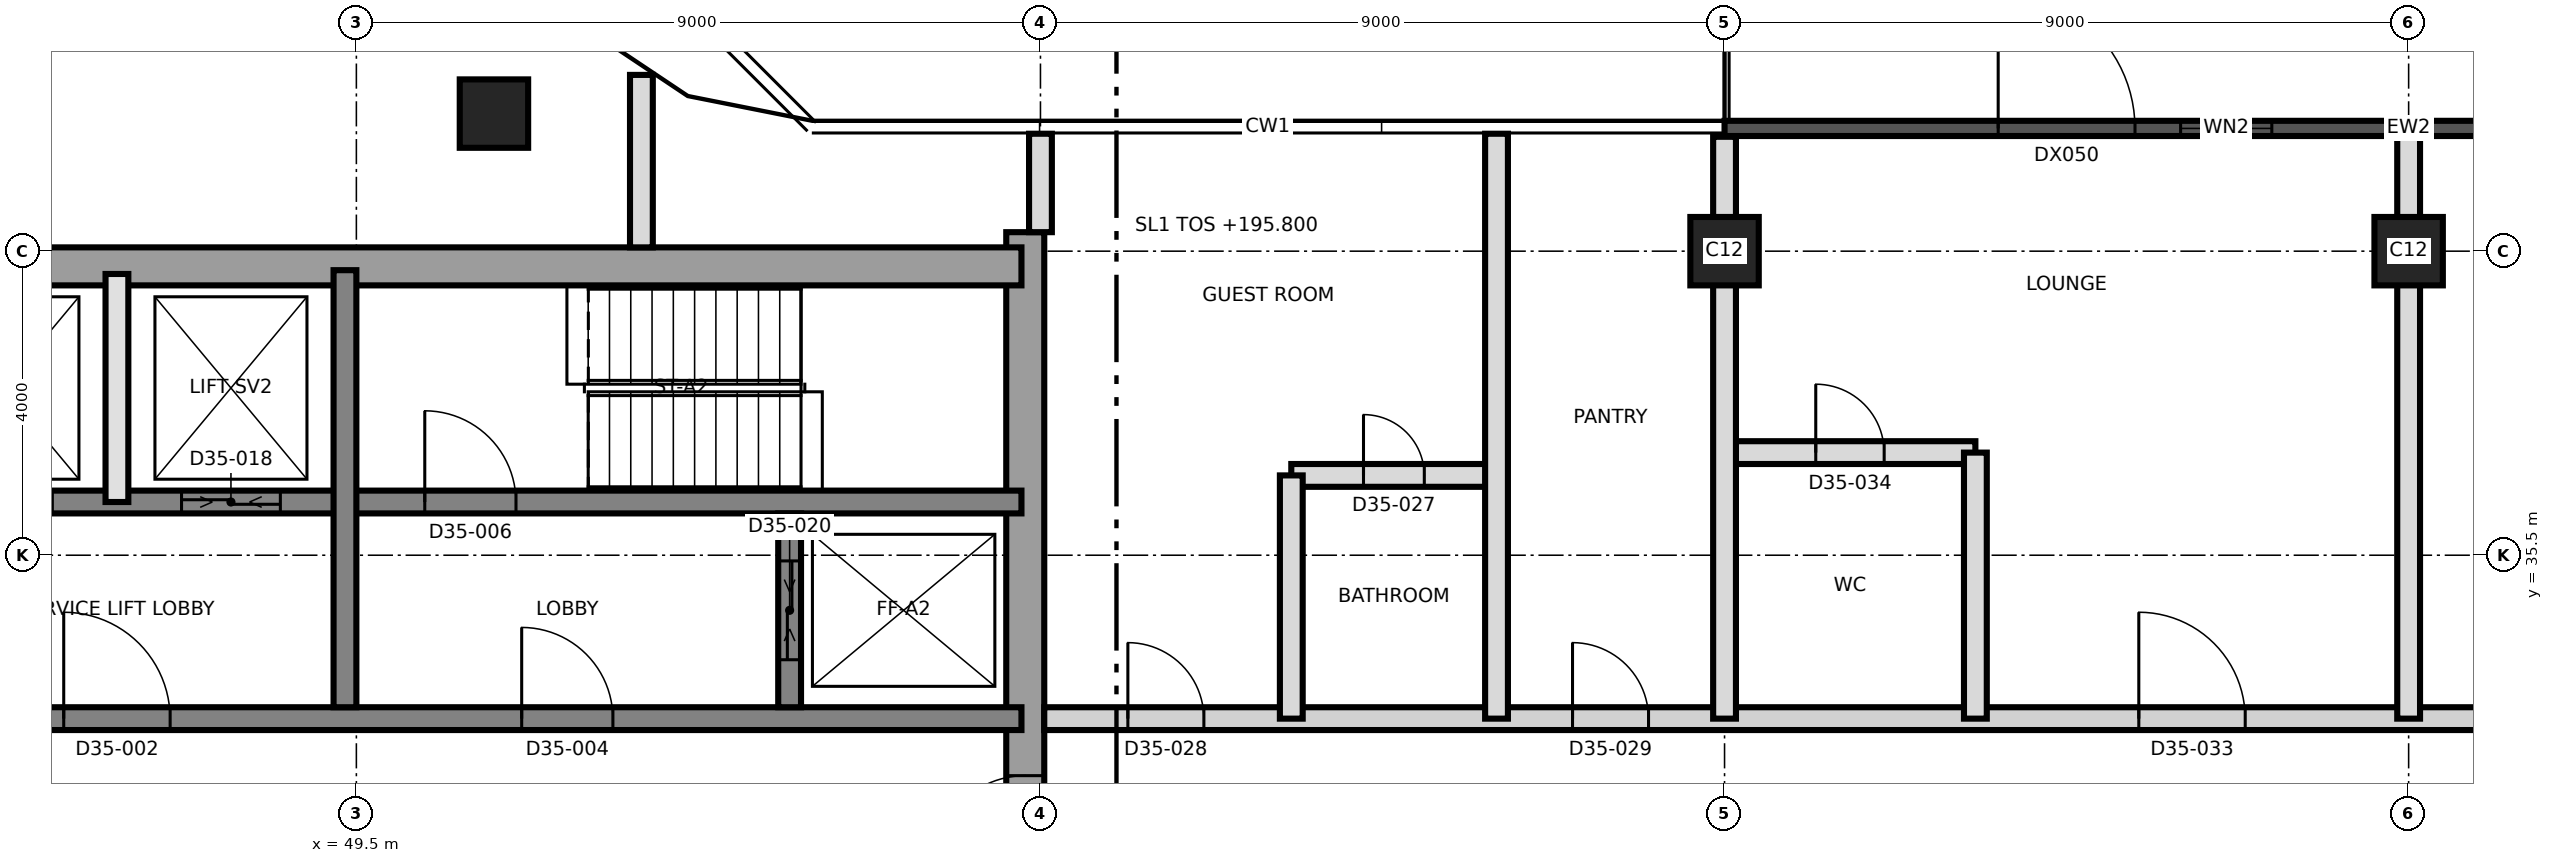
"""IFC4 building model, lengths in metres.
Left out: names, types, materials, properties, quantities, classifications, styles, units other than length and angle.
Written with IfcOpenShell. Run it as: python <this file> out.ifc"""

import sys

from ifc_helpers import new_model, si_unit, direction, frame, frame_2d, origin, origin_2d, place, context, subcontext, project, spatial, rectangle, extrude, element, fill, save


model = new_model("IFC4")
c1 = context("Model", 3, precision=1e-05, world=origin(), true_north=direction((0.0, 1.0)))
c2 = subcontext(c1, "Body", "Model", "MODEL_VIEW")
j1 = project(units=[si_unit("LENGTHUNIT", "METRE"), si_unit("PLANEANGLEUNIT", "RADIAN")], contexts=[c1])
p1 = place(None, origin())
s1 = spatial("IfcSite", under=j1, at=p1, CompositionType="ELEMENT")
p2 = place(p1, origin())
s2 = spatial("IfcBuilding", under=s1, at=p2, CompositionType="ELEMENT")
p3 = place(p2, frame((0.0, 0.0, 195.8)))
s3 = spatial("IfcBuildingStorey", under=s2, at=p3, CompositionType="ELEMENT", Elevation=195.8)
p4 = place(p3, frame((58.3, 21.25, 0.0), z_axis=(0.0, 0.0, 1.0), x_axis=(0.0, 1.0, 0.0)))
e1 = element("IfcWall", 1, at=p4, inside=s3, PredefinedType="SHEAR", context=c2, shape_type="SweptSolid", body=[
    extrude(rectangle(XDim=18.5, YDim=0.5, at=frame_2d((9.25, 0.0))), origin(), (0.0, 0.0, 1.0), 3.7),
])
p5 = place(p4, frame((10.15, 0.0, 0.0)))
e2 = element("IfcOpeningElement", 2, at=p5, cuts=e1, PredefinedType="OPENING", context=c2, shape_type="SweptSolid", body=[
    extrude(rectangle(XDim=1.2, YDim=2.1, at=frame_2d((0.6, 1.05))), frame((0.0, 0.26, 0.0), z_axis=(0.0, -1.0, 0.0), x_axis=(1.0, 0.0, 0.0)), (0.0, 0.0, 1.0), 0.52),
])
p6 = place(p3, frame((31.25, 39.3, 0.0), z_axis=(0.0, 0.0, 1.0), x_axis=(1.0, 0.0, 0.0)))
e3 = element("IfcWall", 3, at=p6, inside=s3, PredefinedType="SHEAR", context=c2, shape_type="SweptSolid", body=[
    extrude(rectangle(XDim=27.0, YDim=0.5, at=frame_2d((13.5, 0.0))), origin(), (0.0, 0.0, 1.0), 3.7),
])
p7 = place(p6, frame((10.45, 0.0, 0.0)))
e4 = element("IfcOpeningElement", 4, at=p7, cuts=e3, PredefinedType="OPENING", context=c2, shape_type="SweptSolid", body=[
    extrude(rectangle(XDim=1.2, YDim=2.1, at=frame_2d((0.6, 1.05))), frame((0.0, 0.26, 0.0), z_axis=(0.0, -1.0, 0.0), x_axis=(1.0, 0.0, 0.0)), (0.0, 0.0, 1.0), 0.52),
])
p8 = place(p3, frame((31.75, 33.35, 0.0), z_axis=(0.0, 0.0, 1.0), x_axis=(1.0, 0.0, 0.0)))
e5 = element("IfcWall", 5, at=p8, inside=s3, PredefinedType="SHEAR", context=c2, shape_type="SweptSolid", body=[
    extrude(rectangle(XDim=26.5, YDim=0.3, at=frame_2d((13.25, 0.0))), origin(), (0.0, 0.0, 1.0), 3.7),
])
p9 = place(p8, frame((13.9, 0.0, 0.0)))
e6 = element("IfcOpeningElement", 6, at=p9, cuts=e5, PredefinedType="OPENING", context=c2, shape_type="SweptSolid", body=[
    extrude(rectangle(XDim=1.4, YDim=2.1, at=frame_2d((0.7, 1.05))), frame((0.0, 0.16, 0.0), z_axis=(0.0, -1.0, 0.0), x_axis=(1.0, 0.0, 0.0)), (0.0, 0.0, 1.0), 0.32),
])
p10 = place(p8, frame((5.375, 0.0, 0.0)))
e7 = element("IfcOpeningElement", 7, at=p10, cuts=e5, PredefinedType="OPENING", context=c2, shape_type="SweptSolid", body=[
    extrude(rectangle(XDim=1.2, YDim=2.1, at=frame_2d((0.6, 1.05))), frame((0.0, 0.16, 0.0), z_axis=(0.0, -1.0, 0.0), x_axis=(1.0, 0.0, 0.0)), (0.0, 0.0, 1.0), 0.32),
])
p11 = place(p8, frame((19.925, 0.0, 0.0)))
e8 = element("IfcOpeningElement", 8, at=p11, cuts=e5, PredefinedType="OPENING", context=c2, shape_type="SweptSolid", body=[
    extrude(rectangle(XDim=1.2, YDim=2.1, at=frame_2d((0.6, 1.05))), frame((0.0, 0.16, 0.0), z_axis=(0.0, -1.0, 0.0), x_axis=(1.0, 0.0, 0.0)), (0.0, 0.0, 1.0), 0.32),
])
p12 = place(p3, frame((43.5, 36.2, 0.0), z_axis=(0.0, 0.0, 1.0), x_axis=(1.0, 0.0, 0.0)))
e9 = element("IfcWall", 9, at=p12, inside=s3, PredefinedType="SHEAR", context=c2, shape_type="SweptSolid", body=[
    extrude(rectangle(XDim=14.75, YDim=0.3, at=frame_2d((7.375, 0.0))), origin(), (0.0, 0.0, 1.0), 3.7),
])
p13 = place(p12, frame((6.9, 0.0, 0.0)))
e10 = element("IfcOpeningElement", 10, at=p13, cuts=e9, PredefinedType="OPENING", context=c2, shape_type="SweptSolid", body=[
    extrude(rectangle(XDim=1.2, YDim=2.1, at=frame_2d((0.6, 1.05))), frame((0.0, 0.16, 0.0), z_axis=(0.0, -1.0, 0.0), x_axis=(1.0, 0.0, 0.0)), (0.0, 0.0, 1.0), 0.32),
])
p14 = place(p12, frame((0.7, 0.0, 0.0)))
e11 = element("IfcOpeningElement", 11, at=p14, cuts=e9, PredefinedType="OPENING", context=c2, shape_type="SweptSolid", body=[
    extrude(rectangle(XDim=1.3, YDim=2.4, at=frame_2d((0.65, 1.2))), frame((0.0, 0.16, 0.0), z_axis=(0.0, -1.0, 0.0), x_axis=(1.0, 0.0, 0.0)), (0.0, 0.0, 1.0), 0.32),
])
p15 = place(p12, frame((3.7, 0.0, 0.0)))
e12 = element("IfcOpeningElement", 12, at=p15, cuts=e9, PredefinedType="OPENING", context=c2, shape_type="SweptSolid", body=[
    extrude(rectangle(XDim=1.3, YDim=2.4, at=frame_2d((0.65, 1.2))), frame((0.0, 0.16, 0.0), z_axis=(0.0, -1.0, 0.0), x_axis=(1.0, 0.0, 0.0)), (0.0, 0.0, 1.0), 0.32),
])
p16 = place(p3, frame((49.35, 33.5, 0.0), z_axis=(0.0, 0.0, 1.0), x_axis=(0.0, 1.0, 0.0)))
e13 = element("IfcWall", 13, at=p16, inside=s3, PredefinedType="SHEAR", context=c2, shape_type="SweptSolid", body=[
    extrude(rectangle(XDim=5.75, YDim=0.3, at=frame_2d((2.875, 0.0))), origin(), (0.0, 0.0, 1.0), 3.7),
])
p17 = place(p3, frame((55.2, 33.5, 0.0), z_axis=(0.0, 0.0, 1.0), x_axis=(0.0, 1.0, 0.0)))
e14 = element("IfcWall", 14, at=p17, inside=s3, PredefinedType="SHEAR", context=c2, shape_type="SweptSolid", body=[
    extrude(rectangle(XDim=2.55, YDim=0.3, at=frame_2d((1.275, 0.0))), origin(), (0.0, 0.0, 1.0), 3.7),
])
p18 = place(p17, frame((0.625, 0.0, 0.0)))
e15 = element("IfcOpeningElement", 15, at=p18, cuts=e14, PredefinedType="OPENING", context=c2, shape_type="SweptSolid", body=[
    extrude(rectangle(XDim=1.3, YDim=2.4, at=frame_2d((0.65, 1.2))), frame((0.0, 0.16, 0.0), z_axis=(0.0, -1.0, 0.0), x_axis=(1.0, 0.0, 0.0)), (0.0, 0.0, 1.0), 0.32),
])
for number, where, z_axis, x_axis in (
    (16, (67.5, 39.5, 0.0), (0.0, 0.0, 1.0), (1.0, 0.0, 0.0)),
    (17, (76.5, 39.5, 0.0), (0.0, 0.0, 1.0), (1.0, 0.0, 0.0)),
    (18, (51.31, 41.31, 0.0), (0.0, 0.0, 1.0), (1.0, 0.0, 0.0)),
):
    element("IfcColumn", number, at=place(p3, frame(where, z_axis=z_axis, x_axis=x_axis)), inside=s3, PredefinedType="COLUMN", context=c2, shape_type="SweptSolid", body=[
        extrude(rectangle(XDim=0.9, YDim=0.9, at=origin_2d()), origin(), (0.0, 0.0, 1.0), 3.7),
    ])
p19 = place(p3, frame((67.5, 41.115, 0.0), z_axis=(0.0, 0.0, 1.0), x_axis=(1.0, 0.0, 0.0)))
e19 = element("IfcWall", 19, at=p19, inside=s3, PredefinedType="SOLIDWALL", context=c2, shape_type="SweptSolid", body=[
    extrude(rectangle(XDim=18.0, YDim=0.2, at=frame_2d((9.0, 0.0))), origin(), (0.0, 0.0, 1.0), 3.4),
])
p20 = place(p19, frame((12.6, 0.0, 0.0)))
e20 = element("IfcOpeningElement", 20, at=p20, cuts=e19, PredefinedType="OPENING", context=c2, shape_type="SweptSolid", body=[
    extrude(rectangle(XDim=1.8, YDim=2.4, at=frame_2d((0.9, 1.2))), frame((0.0, 0.11, 0.0), z_axis=(0.0, -1.0, 0.0), x_axis=(1.0, 0.0, 0.0)), (0.0, 0.0, 1.0), 0.22),
])
p21 = place(p19, frame((10.8, 0.0, 0.9)))
e21 = element("IfcOpeningElement", 21, at=p21, cuts=e19, PredefinedType="OPENING", context=c2, shape_type="SweptSolid", body=[
    extrude(rectangle(XDim=1.2, YDim=2.1, at=frame_2d((0.6, 1.05))), frame((0.0, 0.11, 0.0), z_axis=(0.0, -1.0, 0.0), x_axis=(1.0, 0.0, 0.0)), (0.0, 0.0, 1.0), 0.22),
])
p22 = place(p19, frame((6.0, 0.0, 0.9)))
e22 = element("IfcOpeningElement", 22, at=p22, cuts=e19, PredefinedType="OPENING", context=c2, shape_type="SweptSolid", body=[
    extrude(rectangle(XDim=1.2, YDim=2.1, at=frame_2d((0.6, 1.05))), frame((0.0, 0.11, 0.0), z_axis=(0.0, -1.0, 0.0), x_axis=(1.0, 0.0, 0.0)), (0.0, 0.0, 1.0), 0.22),
])
p23 = place(p19, frame((3.6, 0.0, 0.0)))
e23 = element("IfcOpeningElement", 23, at=p23, cuts=e19, PredefinedType="OPENING", context=c2, shape_type="SweptSolid", body=[
    extrude(rectangle(XDim=1.8, YDim=2.4, at=frame_2d((0.9, 1.2))), frame((0.0, 0.11, 0.0), z_axis=(0.0, -1.0, 0.0), x_axis=(1.0, 0.0, 0.0)), (0.0, 0.0, 1.0), 0.22),
])
p24 = place(p3, frame((46.35, 36.2, 0.0), z_axis=(0.0, 0.0, 1.0), x_axis=(0.0, 1.0, 0.0)))
e24 = element("IfcWall", 24, at=p24, inside=s3, PredefinedType="SOLIDWALL", context=c2, shape_type="SweptSolid", body=[
    extrude(rectangle(XDim=3.0, YDim=0.3, at=frame_2d((1.5, 0.0))), origin(), (0.0, 0.0, 1.0), 3.4),
])
p25 = place(p3, frame((58.55, 33.35, 0.0), z_axis=(0.0, 0.0, 1.0), x_axis=(1.0, 0.0, 0.0)))
e25 = element("IfcWall", 25, at=p25, inside=s3, PredefinedType="PARTITIONING", context=c2, shape_type="SweptSolid", body=[
    extrude(rectangle(XDim=26.78, YDim=0.3, at=frame_2d((13.39, 0.0))), origin(), (0.0, 0.0, 1.0), 3.4),
])
p26 = place(p25, frame((1.1, 0.0, 0.0)))
e26 = element("IfcOpeningElement", 26, at=p26, cuts=e25, PredefinedType="OPENING", context=c2, shape_type="SweptSolid", body=[
    extrude(rectangle(XDim=1.0, YDim=2.1, at=frame_2d((0.5, 1.05))), frame((0.0, 0.16, 0.0), z_axis=(0.0, -1.0, 0.0), x_axis=(1.0, 0.0, 0.0)), (0.0, 0.0, 1.0), 0.32),
])
p27 = place(p25, frame((6.95, 0.0, 0.0)))
e27 = element("IfcOpeningElement", 27, at=p27, cuts=e25, PredefinedType="OPENING", context=c2, shape_type="SweptSolid", body=[
    extrude(rectangle(XDim=1.0, YDim=2.1, at=frame_2d((0.5, 1.05))), frame((0.0, 0.16, 0.0), z_axis=(0.0, -1.0, 0.0), x_axis=(1.0, 0.0, 0.0)), (0.0, 0.0, 1.0), 0.32),
])
p28 = place(p25, frame((14.4, 0.0, 0.0)))
e28 = element("IfcOpeningElement", 28, at=p28, cuts=e25, PredefinedType="OPENING", context=c2, shape_type="SweptSolid", body=[
    extrude(rectangle(XDim=1.4, YDim=2.4, at=frame_2d((0.7, 1.2))), frame((0.0, 0.16, 0.0), z_axis=(0.0, -1.0, 0.0), x_axis=(1.0, 0.0, 0.0)), (0.0, 0.0, 1.0), 0.32),
])
p29 = place(p25, frame((20.3, 0.0, 0.0)))
e29 = element("IfcOpeningElement", 29, at=p29, cuts=e25, PredefinedType="OPENING", context=c2, shape_type="SweptSolid", body=[
    extrude(rectangle(XDim=1.0, YDim=2.4, at=frame_2d((0.5, 1.2))), frame((0.0, 0.16, 0.0), z_axis=(0.0, -1.0, 0.0), x_axis=(1.0, 0.0, 0.0)), (0.0, 0.0, 1.0), 0.32),
])
p30 = place(p3, frame((61.8, 36.55, 0.0), z_axis=(0.0, 0.0, 1.0), x_axis=(1.0, 0.0, 0.0)))
e30 = element("IfcWall", 30, at=p30, inside=s3, PredefinedType="PARTITIONING", context=c2, shape_type="SweptSolid", body=[
    extrude(rectangle(XDim=2.7, YDim=0.3, at=frame_2d((1.35, 0.0))), origin(), (0.0, 0.0, 1.0), 3.4),
])
p31 = place(p30, frame((0.95, 0.0, 0.0)))
e31 = element("IfcOpeningElement", 31, at=p31, cuts=e30, PredefinedType="OPENING", context=c2, shape_type="SweptSolid", body=[
    extrude(rectangle(XDim=0.8, YDim=2.1, at=frame_2d((0.4, 1.05))), frame((0.0, 0.16, 0.0), z_axis=(0.0, -1.0, 0.0), x_axis=(1.0, 0.0, 0.0)), (0.0, 0.0, 1.0), 0.32),
])
p32 = place(p3, frame((67.5, 36.85, 0.0), z_axis=(0.0, 0.0, 1.0), x_axis=(1.0, 0.0, 0.0)))
e32 = element("IfcWall", 32, at=p32, inside=s3, PredefinedType="PARTITIONING", context=c2, shape_type="SweptSolid", body=[
    extrude(rectangle(XDim=3.3, YDim=0.3, at=frame_2d((1.65, 0.0))), origin(), (0.0, 0.0, 1.0), 3.4),
])
p33 = place(p32, frame((1.2, 0.0, 0.0)))
e33 = element("IfcOpeningElement", 33, at=p33, cuts=e32, PredefinedType="OPENING", context=c2, shape_type="SweptSolid", body=[
    extrude(rectangle(XDim=0.9, YDim=2.1, at=frame_2d((0.45, 1.05))), frame((0.0, 0.16, 0.0), z_axis=(0.0, -1.0, 0.0), x_axis=(1.0, 0.0, 0.0)), (0.0, 0.0, 1.0), 0.32),
])
p34 = place(p3, frame((53.25, 39.55, 0.0), z_axis=(0.0, 0.0, 1.0), x_axis=(0.0, 1.0, 0.0)))
e34 = element("IfcWall", 34, at=p34, inside=s3, PredefinedType="PARTITIONING", context=c2, shape_type="SweptSolid", body=[
    extrude(rectangle(XDim=2.269, YDim=0.3, at=frame_2d((1.135, 0.0))), origin(), (0.0, 0.0, 1.0), 3.4),
])
p35 = place(p3, frame((58.5, 39.75, 0.0), z_axis=(0.0, 0.0, 1.0), x_axis=(0.0, 1.0, 0.0)))
e35 = element("IfcWall", 35, at=p35, inside=s3, PredefinedType="PARTITIONING", context=c2, shape_type="SweptSolid", body=[
    extrude(rectangle(XDim=1.295, YDim=0.3, at=frame_2d((0.647, 0.0))), origin(), (0.0, 0.0, 1.0), 3.4),
])
p36 = place(p3, frame((61.8, 33.35, 0.0), z_axis=(0.0, 0.0, 1.0), x_axis=(0.0, 1.0, 0.0)))
e36 = element("IfcWall", 36, at=p36, inside=s3, PredefinedType="PARTITIONING", context=c2, shape_type="SweptSolid", body=[
    extrude(rectangle(XDim=3.2, YDim=0.3, at=frame_2d((1.6, 0.0))), origin(), (0.0, 0.0, 1.0), 3.4),
])
p37 = place(p3, frame((64.5, 33.35, 0.0), z_axis=(0.0, 0.0, 1.0), x_axis=(0.0, 1.0, 0.0)))
e37 = element("IfcWall", 37, at=p37, inside=s3, PredefinedType="PARTITIONING", context=c2, shape_type="SweptSolid", body=[
    extrude(rectangle(XDim=7.695, YDim=0.3, at=frame_2d((3.847, 0.0))), origin(), (0.0, 0.0, 1.0), 3.4),
])
p38 = place(p3, frame((67.5, 33.35, 0.0), z_axis=(0.0, 0.0, 1.0), x_axis=(0.0, 1.0, 0.0)))
e38 = element("IfcWall", 38, at=p38, inside=s3, PredefinedType="PARTITIONING", context=c2, shape_type="SweptSolid", body=[
    extrude(rectangle(XDim=7.655, YDim=0.3, at=frame_2d((3.827, 0.0))), origin(), (0.0, 0.0, 1.0), 3.4),
])
p39 = place(p3, frame((70.8, 33.35, 0.0), z_axis=(0.0, 0.0, 1.0), x_axis=(0.0, 1.0, 0.0)))
e39 = element("IfcWall", 39, at=p39, inside=s3, PredefinedType="PARTITIONING", context=c2, shape_type="SweptSolid", body=[
    extrude(rectangle(XDim=3.5, YDim=0.3, at=frame_2d((1.75, 0.0))), origin(), (0.0, 0.0, 1.0), 3.4),
])
p40 = place(p3, frame((76.5, 33.35, 0.0), z_axis=(0.0, 0.0, 1.0), x_axis=(0.0, 1.0, 0.0)))
e40 = element("IfcWall", 40, at=p40, inside=s3, PredefinedType="PARTITIONING", context=c2, shape_type="SweptSolid", body=[
    extrude(rectangle(XDim=7.655, YDim=0.3, at=frame_2d((3.827, 0.0))), origin(), (0.0, 0.0, 1.0), 3.4),
])
p41 = place(p22, origin())
e41 = element("IfcWindow", 41, at=p41, inside=s3, PartitioningType="SINGLE_PANEL", PredefinedType="WINDOW", context=c2, shape_type="SweptSolid", body=[
    extrude(rectangle(XDim=1.2, YDim=2.1, at=frame_2d((0.6, 1.05))), frame((0.0, 0.03, 0.0), z_axis=(0.0, -1.0, 0.0), x_axis=(1.0, 0.0, 0.0)), (0.0, 0.0, 1.0), 0.06),
])
fill(e22, e41)
p42 = place(p23, origin())
e42 = element("IfcDoor", 42, at=p42, inside=s3, OperationType="SINGLE_SWING_LEFT", PredefinedType="DOOR", context=c2, shape_type="SweptSolid", body=[
    extrude(rectangle(XDim=1.8, YDim=2.4, at=frame_2d((0.9, 1.2))), frame((0.0, 0.025, 0.0), z_axis=(0.0, -1.0, 0.0), x_axis=(1.0, 0.0, 0.0)), (0.0, 0.0, 1.0), 0.05),
])
fill(e23, e42)
p43 = place(p9, origin())
e43 = element("IfcDoor", 43, at=p43, inside=s3, OperationType="SINGLE_SWING_RIGHT", PredefinedType="DOOR", context=c2, shape_type="SweptSolid", body=[
    extrude(rectangle(XDim=1.4, YDim=2.1, at=frame_2d((0.7, 1.05))), frame((0.0, 0.025, 0.0), z_axis=(0.0, -1.0, 0.0), x_axis=(1.0, 0.0, 0.0)), (0.0, 0.0, 1.0), 0.05),
])
fill(e6, e43)
p44 = place(p11, origin())
e44 = element("IfcDoor", 44, at=p44, inside=s3, OperationType="SINGLE_SWING_RIGHT", PredefinedType="DOOR", context=c2, shape_type="SweptSolid", body=[
    extrude(rectangle(XDim=1.2, YDim=2.1, at=frame_2d((0.6, 1.05))), frame((0.0, 0.025, 0.0), z_axis=(0.0, -1.0, 0.0), x_axis=(1.0, 0.0, 0.0)), (0.0, 0.0, 1.0), 0.05),
])
fill(e8, e44)
p45 = place(p13, origin())
e45 = element("IfcDoor", 45, at=p45, inside=s3, OperationType="SINGLE_SWING_LEFT", PredefinedType="DOOR", context=c2, shape_type="SweptSolid", body=[
    extrude(rectangle(XDim=1.2, YDim=2.1, at=frame_2d((0.6, 1.05))), frame((0.0, 0.025, 0.0), z_axis=(0.0, -1.0, 0.0), x_axis=(1.0, 0.0, 0.0)), (0.0, 0.0, 1.0), 0.05),
])
fill(e10, e45)
p46 = place(p5, origin())
e46 = element("IfcDoor", 46, at=p46, inside=s3, OperationType="SINGLE_SWING_LEFT", PredefinedType="DOOR", context=c2, shape_type="SweptSolid", body=[
    extrude(rectangle(XDim=1.2, YDim=2.1, at=frame_2d((0.6, 1.05))), frame((0.0, 0.025, 0.0), z_axis=(0.0, -1.0, 0.0), x_axis=(1.0, 0.0, 0.0)), (0.0, 0.0, 1.0), 0.05),
])
fill(e2, e46)
p47 = place(p15, origin())
e47 = element("IfcDoor", 47, at=p47, inside=s3, OperationType="SLIDING_TO_LEFT", PredefinedType="DOOR", context=c2, shape_type="SweptSolid", body=[
    extrude(rectangle(XDim=1.3, YDim=2.4, at=frame_2d((0.65, 1.2))), frame((0.0, 0.025, 0.0), z_axis=(0.0, -1.0, 0.0), x_axis=(1.0, 0.0, 0.0)), (0.0, 0.0, 1.0), 0.05),
])
fill(e12, e47)
p48 = place(p18, origin())
e48 = element("IfcDoor", 48, at=p48, inside=s3, OperationType="SLIDING_TO_LEFT", PredefinedType="DOOR", context=c2, shape_type="SweptSolid", body=[
    extrude(rectangle(XDim=1.3, YDim=2.4, at=frame_2d((0.65, 1.2))), frame((0.0, 0.025, 0.0), z_axis=(0.0, -1.0, 0.0), x_axis=(1.0, 0.0, 0.0)), (0.0, 0.0, 1.0), 0.05),
])
fill(e15, e48)
p49 = place(p31, origin())
e49 = element("IfcDoor", 49, at=p49, inside=s3, OperationType="SINGLE_SWING_LEFT", PredefinedType="DOOR", context=c2, shape_type="SweptSolid", body=[
    extrude(rectangle(XDim=0.8, YDim=2.1, at=frame_2d((0.4, 1.05))), frame((0.0, 0.025, 0.0), z_axis=(0.0, -1.0, 0.0), x_axis=(1.0, 0.0, 0.0)), (0.0, 0.0, 1.0), 0.05),
])
fill(e31, e49)
p50 = place(p26, origin())
e50 = element("IfcDoor", 50, at=p50, inside=s3, OperationType="SINGLE_SWING_LEFT", PredefinedType="DOOR", context=c2, shape_type="SweptSolid", body=[
    extrude(rectangle(XDim=1.0, YDim=2.1, at=frame_2d((0.5, 1.05))), frame((0.0, 0.025, 0.0), z_axis=(0.0, -1.0, 0.0), x_axis=(1.0, 0.0, 0.0)), (0.0, 0.0, 1.0), 0.05),
])
fill(e26, e50)
p51 = place(p27, origin())
e51 = element("IfcDoor", 51, at=p51, inside=s3, OperationType="SINGLE_SWING_RIGHT", PredefinedType="DOOR", context=c2, shape_type="SweptSolid", body=[
    extrude(rectangle(XDim=1.0, YDim=2.1, at=frame_2d((0.5, 1.05))), frame((0.0, 0.025, 0.0), z_axis=(0.0, -1.0, 0.0), x_axis=(1.0, 0.0, 0.0)), (0.0, 0.0, 1.0), 0.05),
])
fill(e27, e51)
p52 = place(p28, origin())
e52 = element("IfcDoor", 52, at=p52, inside=s3, OperationType="SINGLE_SWING_LEFT", PredefinedType="DOOR", context=c2, shape_type="SweptSolid", body=[
    extrude(rectangle(XDim=1.4, YDim=2.4, at=frame_2d((0.7, 1.2))), frame((0.0, 0.025, 0.0), z_axis=(0.0, -1.0, 0.0), x_axis=(1.0, 0.0, 0.0)), (0.0, 0.0, 1.0), 0.05),
])
fill(e28, e52)
p53 = place(p33, origin())
e53 = element("IfcDoor", 53, at=p53, inside=s3, OperationType="SINGLE_SWING_LEFT", PredefinedType="DOOR", context=c2, shape_type="SweptSolid", body=[
    extrude(rectangle(XDim=0.9, YDim=2.1, at=frame_2d((0.45, 1.05))), frame((0.0, 0.025, 0.0), z_axis=(0.0, -1.0, 0.0), x_axis=(1.0, 0.0, 0.0)), (0.0, 0.0, 1.0), 0.05),
])
fill(e33, e53)
save(model, sys.argv[1])
